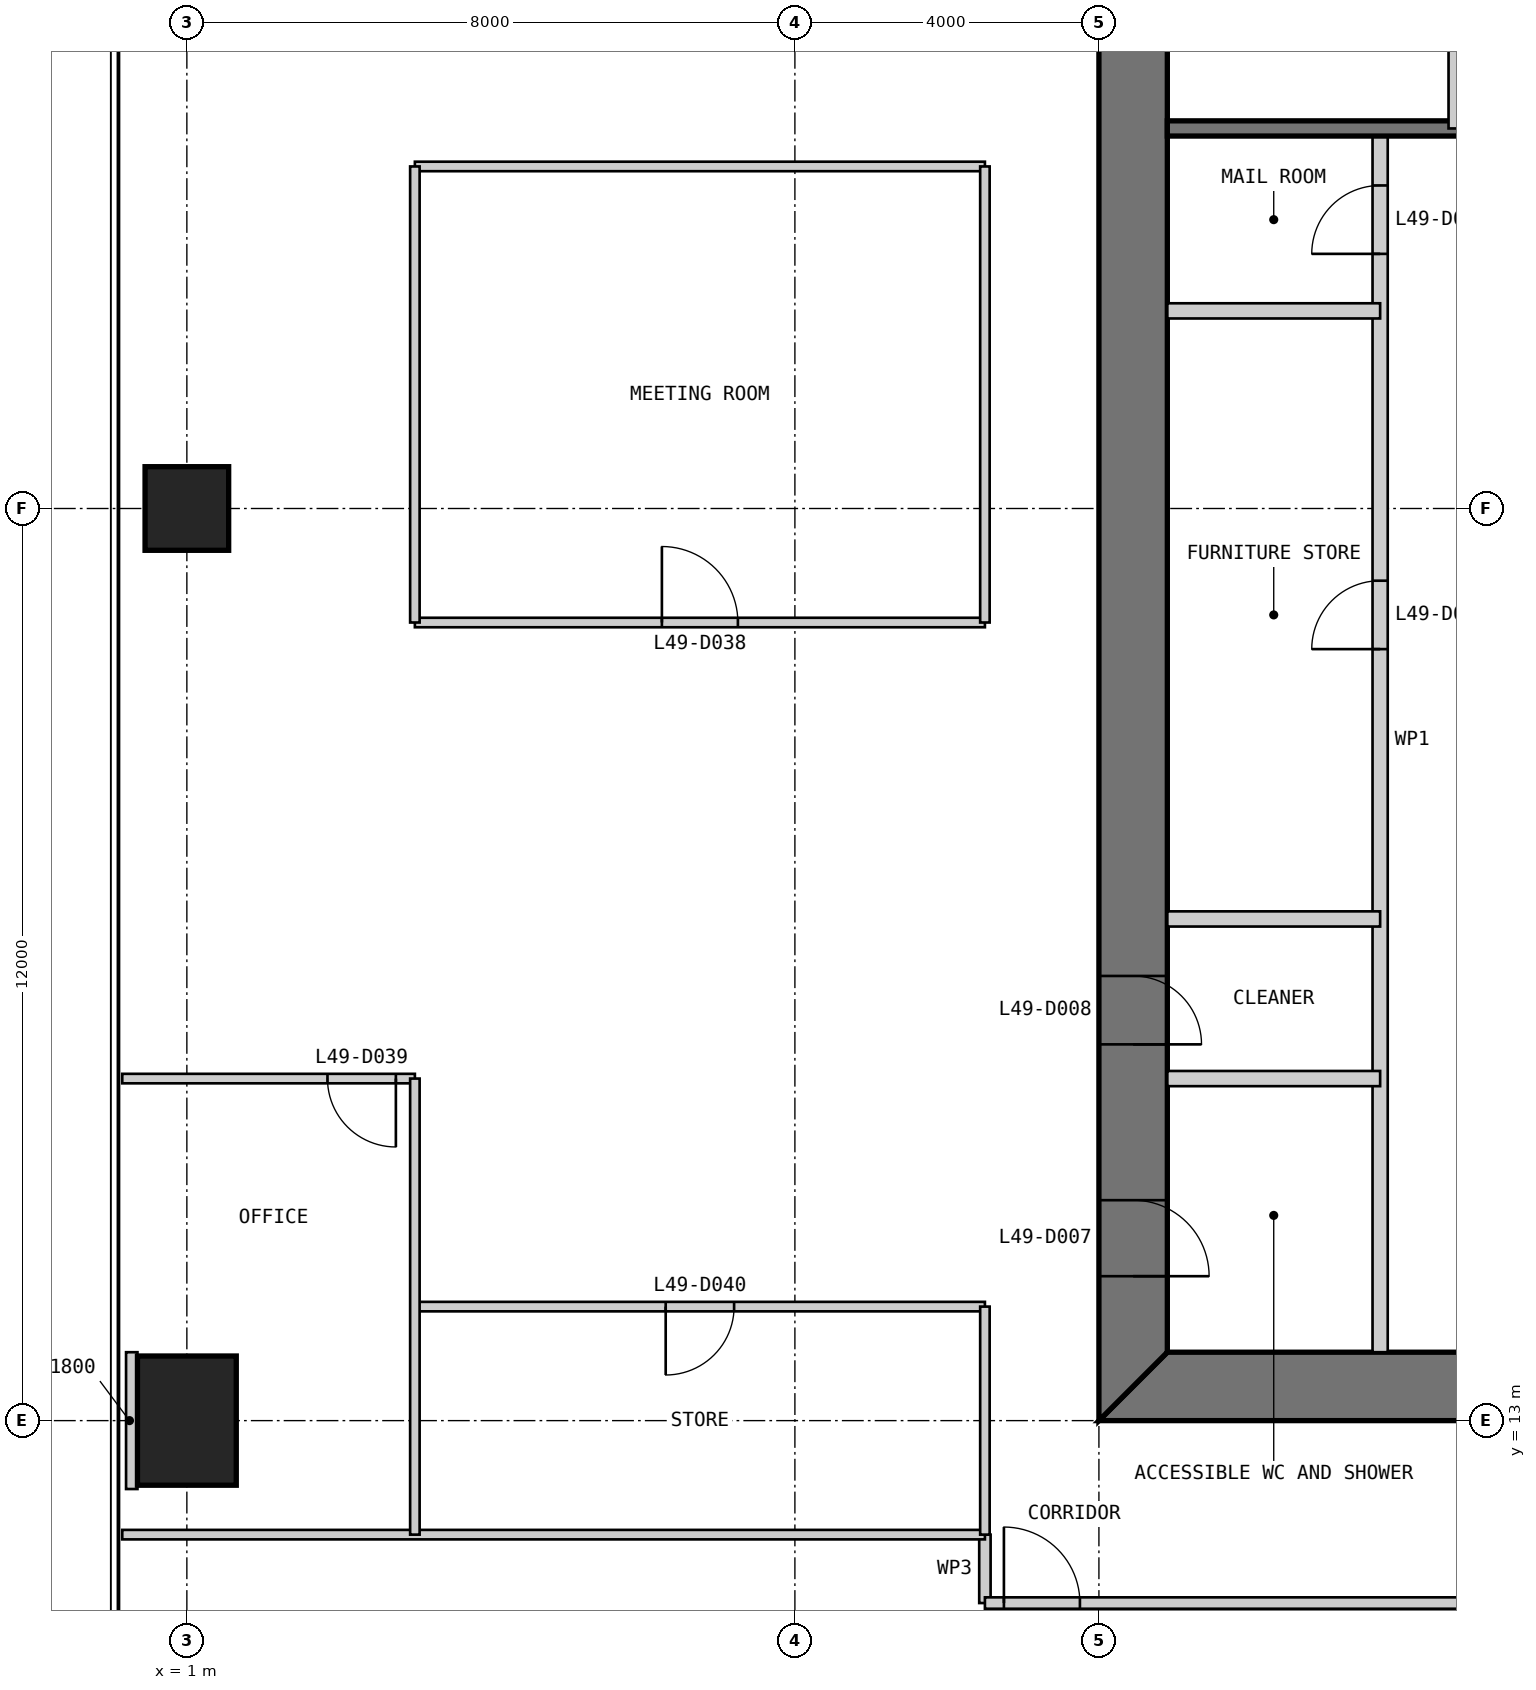
"""IFC4 building model, lengths in metres.
Left out: names, types, materials, properties, quantities, classifications, styles, units other than length and angle.
Written with IfcOpenShell. Run it as: python <this file> out.ifc"""

import sys

from ifc_helpers import new_model, si_unit, direction, frame, frame_2d, origin, origin_2d, place, context, subcontext, project, spatial, polyline, rectangle, outline, extrude, element, fill, save


model = new_model("IFC4")
c1 = context("Model", 3, precision=1e-05, world=origin(), true_north=direction((0.0, 1.0)))
c2 = subcontext(c1, "Body", "Model", "MODEL_VIEW")
j1 = project(units=[si_unit("LENGTHUNIT", "METRE"), si_unit("PLANEANGLEUNIT", "RADIAN")], contexts=[c1])
p1 = place(None, origin())
s1 = spatial("IfcSite", under=j1, at=p1, CompositionType="ELEMENT")
p2 = place(p1, origin())
s2 = spatial("IfcBuilding", under=s1, at=p2, CompositionType="ELEMENT")
p3 = place(p2, frame((0.0, 0.0, 209.8)))
s3 = spatial("IfcBuildingStorey", under=s2, at=p3, CompositionType="ELEMENT", Elevation=209.8)
p4 = place(p3, frame((1.0, 25.0, 0.0), z_axis=(0.0, 0.0, 1.0), x_axis=(1.0, 0.0, 0.0)))
e1 = element("IfcColumn", 1, at=p4, inside=s3, PredefinedType="COLUMN", context=c2, shape_type="SweptSolid", body=[
    extrude(rectangle(XDim=1.1, YDim=1.1, at=origin_2d()), origin(), (0.0, 0.0, 1.0), 4.0),
])
p5 = place(p3, frame((1.0, 13.0, 0.0), z_axis=(0.0, 0.0, 1.0), x_axis=(1.0, 0.0, 0.0)))
e2 = element("IfcColumn", 2, at=p5, inside=s3, PredefinedType="COLUMN", context=c2, shape_type="SweptSolid", body=[
    extrude(rectangle(XDim=1.3, YDim=1.7, at=origin_2d()), origin(), (0.0, 0.0, 1.0), 4.0),
])
p6 = place(p3, frame((13.0, 13.45, 0.0), z_axis=(0.0, 0.0, 1.0), x_axis=(1.0, 0.0, 0.0)))
e3 = element("IfcWall", 3, at=p6, inside=s3, PredefinedType="SHEAR", context=c2, shape_type="SweptSolid", body=[
    extrude(outline(polyline([(0.0, -0.45), (24.0, -0.45), (23.1, 0.45), (0.9, 0.45), (0.0, -0.45)])), origin(), (0.0, 0.0, 1.0), 4.0),
])
p7 = place(p6, frame((4.9, 0.0, 0.0)))
e4 = element("IfcOpeningElement", 4, at=p7, cuts=e3, PredefinedType="OPENING", context=c2, shape_type="SweptSolid", body=[
    extrude(rectangle(XDim=1.0, YDim=2.2, at=frame_2d((0.5, 1.1))), frame((0.0, 0.46, 0.0), z_axis=(0.0, -1.0, 0.0), x_axis=(1.0, 0.0, 0.0)), (0.0, 0.0, 1.0), 0.92),
])
p8 = place(p6, frame((8.9, 0.0, 0.0)))
e5 = element("IfcOpeningElement", 5, at=p8, cuts=e3, PredefinedType="OPENING", context=c2, shape_type="SweptSolid", body=[
    extrude(rectangle(XDim=1.1, YDim=2.2, at=frame_2d((0.55, 1.1))), frame((0.0, 0.46, 0.0), z_axis=(0.0, -1.0, 0.0), x_axis=(1.0, 0.0, 0.0)), (0.0, 0.0, 1.0), 0.92),
])
p9 = place(p6, frame((15.05, 0.0, 0.0)))
e6 = element("IfcOpeningElement", 6, at=p9, cuts=e3, PredefinedType="OPENING", context=c2, shape_type="SweptSolid", body=[
    extrude(rectangle(XDim=0.9, YDim=2.2, at=frame_2d((0.45, 1.1))), frame((0.0, 0.46, 0.0), z_axis=(0.0, -1.0, 0.0), x_axis=(1.0, 0.0, 0.0)), (0.0, 0.0, 1.0), 0.92),
])
p10 = place(p6, frame((17.9, 0.0, 0.0)))
e7 = element("IfcOpeningElement", 7, at=p10, cuts=e3, PredefinedType="OPENING", context=c2, shape_type="SweptSolid", body=[
    extrude(rectangle(XDim=1.0, YDim=2.2, at=frame_2d((0.5, 1.1))), frame((0.0, 0.46, 0.0), z_axis=(0.0, -1.0, 0.0), x_axis=(1.0, 0.0, 0.0)), (0.0, 0.0, 1.0), 0.92),
])
p11 = place(p6, frame((21.4, 0.0, 0.0)))
e8 = element("IfcOpeningElement", 8, at=p11, cuts=e3, PredefinedType="OPENING", context=c2, shape_type="SweptSolid", body=[
    extrude(rectangle(XDim=1.0, YDim=2.2, at=frame_2d((0.5, 1.1))), frame((0.0, 0.46, 0.0), z_axis=(0.0, -1.0, 0.0), x_axis=(1.0, 0.0, 0.0)), (0.0, 0.0, 1.0), 0.92),
])
p12 = place(p3, frame((13.45, 36.1, 0.0), z_axis=(0.0, 0.0, 1.0), x_axis=(0.0, -1.0, 0.0)))
e9 = element("IfcWall", 9, at=p12, inside=s3, PredefinedType="SHEAR", context=c2, shape_type="SweptSolid", body=[
    extrude(outline(polyline([(-0.9, -0.45), (23.1, -0.45), (22.2, 0.45), (0.0, 0.45), (-0.9, -0.45)])), origin(), (0.0, 0.0, 1.0), 4.0),
])
p13 = place(p12, frame((20.2, 0.0, 0.0)))
e10 = element("IfcOpeningElement", 10, at=p13, cuts=e9, PredefinedType="OPENING", context=c2, shape_type="SweptSolid", body=[
    extrude(rectangle(XDim=1.0, YDim=2.2, at=frame_2d((0.5, 1.1))), frame((0.0, 0.46, 0.0), z_axis=(0.0, -1.0, 0.0), x_axis=(1.0, 0.0, 0.0)), (0.0, 0.0, 1.0), 0.92),
])
p14 = place(p12, frame((17.25, 0.0, 0.0)))
e11 = element("IfcOpeningElement", 11, at=p14, cuts=e9, PredefinedType="OPENING", context=c2, shape_type="SweptSolid", body=[
    extrude(rectangle(XDim=0.9, YDim=2.2, at=frame_2d((0.45, 1.1))), frame((0.0, 0.46, 0.0), z_axis=(0.0, -1.0, 0.0), x_axis=(1.0, 0.0, 0.0)), (0.0, 0.0, 1.0), 0.92),
])
p15 = place(p3, frame((16.7, 13.9, 0.0), z_axis=(0.0, 0.0, 1.0), x_axis=(0.0, 1.0, 0.0)))
e12 = element("IfcWall", 12, at=p15, inside=s3, PredefinedType="PARTITIONING", context=c2, shape_type="SweptSolid", body=[
    extrude(rectangle(XDim=16.1, YDim=0.2, at=frame_2d((8.05, 0.0))), origin(), (0.0, 0.0, 1.0), 3.8),
])
p16 = place(p15, frame((9.25, 0.0, 0.0)))
e13 = element("IfcOpeningElement", 13, at=p16, cuts=e12, PredefinedType="OPENING", context=c2, shape_type="SweptSolid", body=[
    extrude(rectangle(XDim=0.9, YDim=2.2, at=frame_2d((0.45, 1.1))), frame((0.0, 0.11, 0.0), z_axis=(0.0, -1.0, 0.0), x_axis=(1.0, 0.0, 0.0)), (0.0, 0.0, 1.0), 0.22),
])
p17 = place(p15, frame((14.45, 0.0, 0.0)))
e14 = element("IfcOpeningElement", 14, at=p17, cuts=e12, PredefinedType="OPENING", context=c2, shape_type="SweptSolid", body=[
    extrude(rectangle(XDim=0.9, YDim=2.2, at=frame_2d((0.45, 1.1))), frame((0.0, 0.11, 0.0), z_axis=(0.0, -1.0, 0.0), x_axis=(1.0, 0.0, 0.0)), (0.0, 0.0, 1.0), 0.22),
])
for number, where, z_axis, x_axis in (
    (15, (13.9, 17.5, 0.0), (0.0, 0.0, 1.0), (1.0, 0.0, 0.0)),
    (16, (13.9, 19.6, 0.0), (0.0, 0.0, 1.0), (1.0, 0.0, 0.0)),
    (17, (13.9, 27.6, 0.0), (0.0, 0.0, 1.0), (1.0, 0.0, 0.0)),
):
    element("IfcWall", number, at=place(p3, frame(where, z_axis=z_axis, x_axis=x_axis)), inside=s3, PredefinedType="PARTITIONING", context=c2, shape_type="SweptSolid", body=[
        extrude(rectangle(XDim=2.8, YDim=0.2, at=frame_2d((1.4, 0.0))), origin(), (0.0, 0.0, 1.0), 3.8),
    ])
p18 = place(p3, frame((29.7, 30.0, 0.0), z_axis=(0.0, 0.0, 1.0), x_axis=(-1.0, 0.0, 0.0)))
e18 = element("IfcWall", 18, at=p18, inside=s3, PredefinedType="SOLIDWALL", context=c2, shape_type="SweptSolid", body=[
    extrude(rectangle(XDim=15.8, YDim=0.2, at=frame_2d((7.9, 0.0))), origin(), (0.0, 0.0, 1.0), 3.8),
])
p19 = place(p3, frame((17.7, 36.1, 0.0), z_axis=(0.0, 0.0, 1.0), x_axis=(0.0, -1.0, 0.0)))
e19 = element("IfcWall", 19, at=p19, inside=s3, PredefinedType="PARTITIONING", context=c2, shape_type="SweptSolid", body=[
    extrude(rectangle(XDim=6.1, YDim=0.2, at=frame_2d((3.05, 0.0))), origin(), (0.0, 0.0, 1.0), 3.8),
])
p20 = place(p3, frame((11.5, 11.5, 0.0), z_axis=(0.0, 0.0, 1.0), x_axis=(0.0, -1.0, 0.0)))
e20 = element("IfcWall", 20, at=p20, inside=s3, PredefinedType="PARTITIONING", context=c2, shape_type="SweptSolid", body=[
    extrude(rectangle(XDim=0.9, YDim=0.15, at=frame_2d((0.45, 0.0))), origin(), (0.0, 0.0, 1.0), 3.85),
])
p21 = place(p3, frame((11.5, 10.6, 0.0), z_axis=(0.0, 0.0, 1.0), x_axis=(1.0, 0.0, 0.0)))
e21 = element("IfcWall", 21, at=p21, inside=s3, PredefinedType="PARTITIONING", context=c2, shape_type="SweptSolid", body=[
    extrude(rectangle(XDim=27.0, YDim=0.15, at=frame_2d((13.5, 0.0))), origin(), (0.0, 0.0, 1.0), 3.85),
])
p22 = place(p21, frame((0.25, 0.0, 0.0)))
e22 = element("IfcOpeningElement", 22, at=p22, cuts=e21, PredefinedType="OPENING", context=c2, shape_type="SweptSolid", body=[
    extrude(rectangle(XDim=1.0, YDim=2.2, at=frame_2d((0.5, 1.1))), frame((0.0, 0.085, 0.0), z_axis=(0.0, -1.0, 0.0), x_axis=(1.0, 0.0, 0.0)), (0.0, 0.0, 1.0), 0.17),
])
p23 = place(p21, frame((22.75, 0.0, 0.0)))
e23 = element("IfcOpeningElement", 23, at=p23, cuts=e21, PredefinedType="OPENING", context=c2, shape_type="SweptSolid", body=[
    extrude(rectangle(XDim=1.0, YDim=2.2, at=frame_2d((0.5, 1.1))), frame((0.0, 0.085, 0.0), z_axis=(0.0, -1.0, 0.0), x_axis=(1.0, 0.0, 0.0)), (0.0, 0.0, 1.0), 0.17),
])
p24 = place(p3, frame((0.15, 11.5, 0.0), z_axis=(0.0, 0.0, 1.0), x_axis=(1.0, 0.0, 0.0)))
e24 = element("IfcWall", 24, at=p24, inside=s3, PredefinedType="PARTITIONING", context=c2, shape_type="SweptSolid", body=[
    extrude(rectangle(XDim=11.35, YDim=0.125, at=frame_2d((5.675, 0.0))), origin(), (0.0, 0.0, 1.0), 3.85),
])
p25 = place(p3, frame((4.0, 29.5, 0.0), z_axis=(0.0, 0.0, 1.0), x_axis=(1.0, 0.0, 0.0)))
e25 = element("IfcWall", 25, at=p25, inside=s3, PredefinedType="PARTITIONING", context=c2, shape_type="SweptSolid", body=[
    extrude(rectangle(XDim=7.5, YDim=0.125, at=frame_2d((3.75, 0.0))), origin(), (0.0, 0.0, 1.0), 3.85),
])
p26 = place(p3, frame((4.0, 23.5, 0.0), z_axis=(0.0, 0.0, 1.0), x_axis=(1.0, 0.0, 0.0)))
e26 = element("IfcWall", 26, at=p26, inside=s3, PredefinedType="PARTITIONING", context=c2, shape_type="SweptSolid", body=[
    extrude(rectangle(XDim=7.5, YDim=0.125, at=frame_2d((3.75, 0.0))), origin(), (0.0, 0.0, 1.0), 3.85),
])
p27 = place(p26, frame((3.25, 0.0, 0.0)))
e27 = element("IfcOpeningElement", 27, at=p27, cuts=e26, PredefinedType="OPENING", context=c2, shape_type="SweptSolid", body=[
    extrude(rectangle(XDim=1.0, YDim=2.2, at=frame_2d((0.5, 1.1))), frame((0.0, 0.073, 0.0), z_axis=(0.0, -1.0, 0.0), x_axis=(1.0, 0.0, 0.0)), (0.0, 0.0, 1.0), 0.145),
])
p28 = place(p3, frame((0.15, 17.5, 0.0), z_axis=(0.0, 0.0, 1.0), x_axis=(1.0, 0.0, 0.0)))
e28 = element("IfcWall", 28, at=p28, inside=s3, PredefinedType="PARTITIONING", context=c2, shape_type="SweptSolid", body=[
    extrude(rectangle(XDim=3.85, YDim=0.125, at=frame_2d((1.925, 0.0))), origin(), (0.0, 0.0, 1.0), 3.85),
])
p29 = place(p28, frame((2.7, 0.0, 0.0)))
e29 = element("IfcOpeningElement", 29, at=p29, cuts=e28, PredefinedType="OPENING", context=c2, shape_type="SweptSolid", body=[
    extrude(rectangle(XDim=0.9, YDim=2.2, at=frame_2d((0.45, 1.1))), frame((0.0, 0.073, 0.0), z_axis=(0.0, -1.0, 0.0), x_axis=(1.0, 0.0, 0.0)), (0.0, 0.0, 1.0), 0.145),
])
p30 = place(p3, frame((4.0, 14.5, 0.0), z_axis=(0.0, 0.0, 1.0), x_axis=(1.0, 0.0, 0.0)))
e30 = element("IfcWall", 30, at=p30, inside=s3, PredefinedType="PARTITIONING", context=c2, shape_type="SweptSolid", body=[
    extrude(rectangle(XDim=7.5, YDim=0.125, at=frame_2d((3.75, 0.0))), origin(), (0.0, 0.0, 1.0), 3.85),
])
p31 = place(p30, frame((3.3, 0.0, 0.0)))
e31 = element("IfcOpeningElement", 31, at=p31, cuts=e30, PredefinedType="OPENING", context=c2, shape_type="SweptSolid", body=[
    extrude(rectangle(XDim=0.9, YDim=2.2, at=frame_2d((0.45, 1.1))), frame((0.0, 0.073, 0.0), z_axis=(0.0, -1.0, 0.0), x_axis=(1.0, 0.0, 0.0)), (0.0, 0.0, 1.0), 0.145),
])
for number, where, z_axis, x_axis in (
    (32, (4.0, 29.5, 0.0), (0.0, 0.0, 1.0), (0.0, -1.0, 0.0)),
    (33, (4.0, 17.5, 0.0), (0.0, 0.0, 1.0), (0.0, -1.0, 0.0)),
):
    element("IfcWall", number, at=place(p3, frame(where, z_axis=z_axis, x_axis=x_axis)), inside=s3, PredefinedType="PARTITIONING", context=c2, shape_type="SweptSolid", body=[
        extrude(rectangle(XDim=6.0, YDim=0.125, at=frame_2d((3.0, 0.0))), origin(), (0.0, 0.0, 1.0), 3.238),
    ])
p32 = place(p3, frame((11.5, 29.5, 0.0), z_axis=(0.0, 0.0, 1.0), x_axis=(0.0, -1.0, 0.0)))
e34 = element("IfcWall", 34, at=p32, inside=s3, PredefinedType="PARTITIONING", context=c2, shape_type="SweptSolid", body=[
    extrude(rectangle(XDim=6.0, YDim=0.125, at=frame_2d((3.0, 0.0))), origin(), (0.0, 0.0, 1.0), 3.85),
])
p33 = place(p3, frame((11.5, 14.5, 0.0), z_axis=(0.0, 0.0, 1.0), x_axis=(0.0, -1.0, 0.0)))
e35 = element("IfcWall", 35, at=p33, inside=s3, PredefinedType="PARTITIONING", context=c2, shape_type="SweptSolid", body=[
    extrude(rectangle(XDim=3.0, YDim=0.125, at=frame_2d((1.5, 0.0))), origin(), (0.0, 0.0, 1.0), 3.85),
])
p34 = place(p3, frame((0.2, 13.0, 0.0), z_axis=(0.0, 0.0, 1.0), x_axis=(1.0, 0.0, 0.0)))
e36 = element("IfcWall", 36, at=p34, inside=s3, PredefinedType="PARTITIONING", context=c2, shape_type="SweptSolid", body=[
    extrude(rectangle(XDim=0.15, YDim=1.8, at=frame_2d((0.075, 0.0))), origin(), (0.0, 0.0, 1.0), 3.85),
])
p35 = place(p13, origin())
e37 = element("IfcDoor", 37, at=p35, inside=s3, OperationType="SINGLE_SWING_RIGHT", PredefinedType="DOOR", context=c2, shape_type="SweptSolid", body=[
    extrude(rectangle(XDim=1.0, YDim=2.2, at=frame_2d((0.5, 1.1))), frame((0.0, 0.025, 0.0), z_axis=(0.0, -1.0, 0.0), x_axis=(1.0, 0.0, 0.0)), (0.0, 0.0, 1.0), 0.05),
    extrude(outline(polyline([(0.0, 0.0), (0.04, 0.0), (0.04, 2.16), (0.96, 2.16), (0.96, 0.0), (1.0, 0.0), (1.0, 2.2), (0.0, 2.2), (0.0, 0.0)])), frame((0.0, 0.3, 0.0), z_axis=(0.0, -1.0, 0.0), x_axis=(1.0, 0.0, 0.0)), (0.0, 0.0, 1.0), 0.6),
])
fill(e10, e37)
p36 = place(p14, origin())
e38 = element("IfcDoor", 38, at=p36, inside=s3, OperationType="SINGLE_SWING_RIGHT", PredefinedType="DOOR", context=c2, shape_type="SweptSolid", body=[
    extrude(rectangle(XDim=0.9, YDim=2.2, at=frame_2d((0.45, 1.1))), frame((0.0, 0.025, 0.0), z_axis=(0.0, -1.0, 0.0), x_axis=(1.0, 0.0, 0.0)), (0.0, 0.0, 1.0), 0.05),
    extrude(outline(polyline([(0.0, 0.0), (0.04, 0.0), (0.04, 2.16), (0.86, 2.16), (0.86, 0.0), (0.9, 0.0), (0.9, 2.2), (0.0, 2.2), (0.0, 0.0)])), frame((0.0, 0.3, 0.0), z_axis=(0.0, -1.0, 0.0), x_axis=(1.0, 0.0, 0.0)), (0.0, 0.0, 1.0), 0.6),
])
fill(e11, e38)
p37 = place(p16, origin())
e39 = element("IfcDoor", 39, at=p37, inside=s3, OperationType="SINGLE_SWING_LEFT", PredefinedType="DOOR", context=c2, shape_type="SweptSolid", body=[
    extrude(rectangle(XDim=0.9, YDim=2.2, at=frame_2d((0.45, 1.1))), frame((0.0, 0.025, 0.0), z_axis=(0.0, -1.0, 0.0), x_axis=(1.0, 0.0, 0.0)), (0.0, 0.0, 1.0), 0.05),
])
fill(e13, e39)
p38 = place(p17, origin())
e40 = element("IfcDoor", 40, at=p38, inside=s3, OperationType="SINGLE_SWING_LEFT", PredefinedType="DOOR", context=c2, shape_type="SweptSolid", body=[
    extrude(rectangle(XDim=0.9, YDim=2.2, at=frame_2d((0.45, 1.1))), frame((0.0, 0.025, 0.0), z_axis=(0.0, -1.0, 0.0), x_axis=(1.0, 0.0, 0.0)), (0.0, 0.0, 1.0), 0.05),
])
fill(e14, e40)
p39 = place(p22, origin())
e41 = element("IfcDoor", 41, at=p39, inside=s3, OperationType="SINGLE_SWING_LEFT", PredefinedType="DOOR", context=c2, shape_type="SweptSolid", body=[
    extrude(rectangle(XDim=1.0, YDim=2.2, at=frame_2d((0.5, 1.1))), frame((0.0, 0.025, 0.0), z_axis=(0.0, -1.0, 0.0), x_axis=(1.0, 0.0, 0.0)), (0.0, 0.0, 1.0), 0.05),
])
fill(e22, e41)
p40 = place(p27, origin())
e42 = element("IfcDoor", 42, at=p40, inside=s3, OperationType="SINGLE_SWING_LEFT", PredefinedType="DOOR", context=c2, shape_type="SweptSolid", body=[
    extrude(rectangle(XDim=1.0, YDim=2.2, at=frame_2d((0.5, 1.1))), frame((0.0, 0.025, 0.0), z_axis=(0.0, -1.0, 0.0), x_axis=(1.0, 0.0, 0.0)), (0.0, 0.0, 1.0), 0.05),
])
fill(e27, e42)
p41 = place(p29, frame((0.9, 0.0, 0.0), z_axis=(0.0, 0.0, 1.0), x_axis=(-1.0, 0.0, 0.0)))
e43 = element("IfcDoor", 43, at=p41, inside=s3, OperationType="SINGLE_SWING_LEFT", PredefinedType="DOOR", context=c2, shape_type="SweptSolid", body=[
    extrude(rectangle(XDim=0.9, YDim=2.2, at=frame_2d((0.45, 1.1))), frame((0.0, 0.025, 0.0), z_axis=(0.0, -1.0, 0.0), x_axis=(1.0, 0.0, 0.0)), (0.0, 0.0, 1.0), 0.05),
])
fill(e29, e43)
p42 = place(p31, frame((0.9, 0.0, 0.0), z_axis=(0.0, 0.0, 1.0), x_axis=(-1.0, 0.0, 0.0)))
e44 = element("IfcDoor", 44, at=p42, inside=s3, OperationType="SINGLE_SWING_RIGHT", PredefinedType="DOOR", context=c2, shape_type="SweptSolid", body=[
    extrude(rectangle(XDim=0.9, YDim=2.2, at=frame_2d((0.45, 1.1))), frame((0.0, 0.025, 0.0), z_axis=(0.0, -1.0, 0.0), x_axis=(1.0, 0.0, 0.0)), (0.0, 0.0, 1.0), 0.05),
])
fill(e31, e44)
save(model, sys.argv[1])
